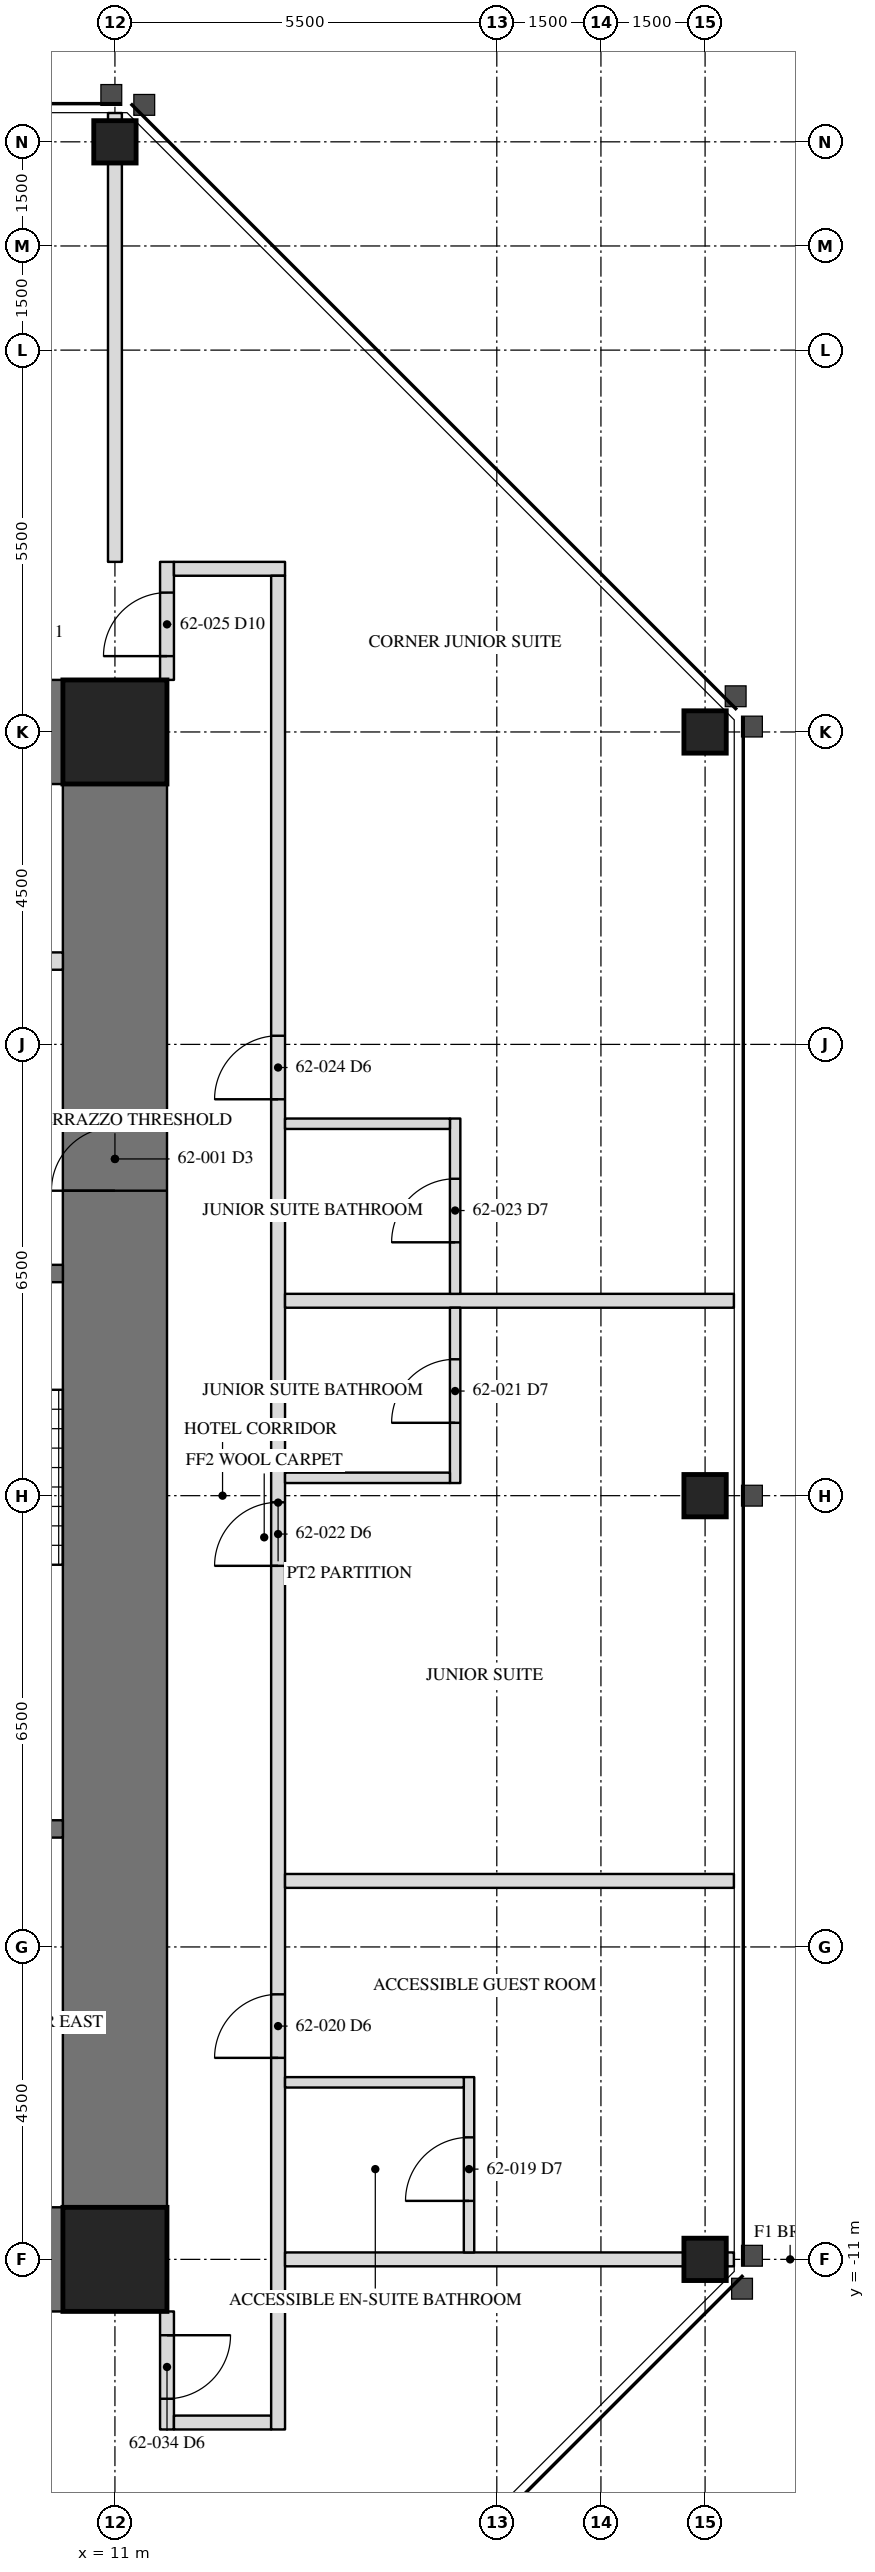
"""IFC4 building model, lengths in metres.
Left out: names, types, materials, properties, quantities, classifications, styles, units other than length and angle.
Written with IfcOpenShell. Run it as: python <this file> out.ifc"""

import sys

from ifc_helpers import new_model, si_unit, direction, frame, frame_2d, origin, origin_2d, place, context, subcontext, project, spatial, rectangle, hollow_rectangle, extrude, element, fill, save


model = new_model("IFC4")
c1 = context("Model", 3, precision=1e-05, world=origin(), true_north=direction((0.0, 1.0)))
c2 = subcontext(c1, "Body", "Model", "MODEL_VIEW")
j1 = project(units=[si_unit("LENGTHUNIT", "METRE"), si_unit("PLANEANGLEUNIT", "RADIAN")], contexts=[c1])
p1 = place(None, origin())
s1 = spatial("IfcSite", under=j1, at=p1, CompositionType="ELEMENT")
p2 = place(p1, origin())
s2 = spatial("IfcBuilding", under=s1, at=p2, CompositionType="ELEMENT")
p3 = place(p2, frame((0.0, 0.0, 253.7)))
s3 = spatial("IfcBuildingStorey", under=s2, at=p3, CompositionType="ELEMENT", Elevation=253.7)
for number, where, z_axis, x_axis in (
    (1, (19.5, -11.0, 0.0), (0.0, 0.0, 1.0), (0.0, 1.0, 0.0)),
    (2, (19.5, 0.0, 0.0), (0.0, 0.0, 1.0), (0.0, 1.0, 0.0)),
    (3, (19.5, 11.0, 0.0), (0.0, 0.0, 1.0), (0.0, 1.0, 0.0)),
    (4, (11.0, 19.5, 0.0), (0.0, 0.0, 1.0), (1.0, 0.0, 0.0)),
):
    element("IfcColumn", number, at=place(p3, frame(where, z_axis=z_axis, x_axis=x_axis)), inside=s3, PredefinedType="COLUMN", context=c2, shape_type="SweptSolid", body=[
        extrude(hollow_rectangle(XDim=0.61, YDim=0.61, WallThickness=0.051, at=origin_2d()), origin(), (0.0, 0.0, 1.0), 3.5),
    ])
p4 = place(p3, frame((11.0, -11.0, 0.0), z_axis=(0.0, 0.0, 1.0), x_axis=(0.0, 1.0, 0.0)))
e5 = element("IfcWall", 5, at=p4, inside=s3, PredefinedType="SHEAR", context=c2, shape_type="SweptSolid", body=[
    extrude(rectangle(XDim=22.0, YDim=1.5, at=frame_2d((11.0, 0.0))), origin(), (0.0, 0.0, 1.0), 3.5),
])
p5 = place(p4, frame((15.393, 0.0, 0.0)))
e6 = element("IfcOpeningElement", 6, at=p5, cuts=e5, PredefinedType="OPENING", context=c2, shape_type="SweptSolid", body=[
    extrude(rectangle(XDim=0.915, YDim=2.134, at=frame_2d((0.458, 1.067))), frame((0.0, 0.76, 0.0), z_axis=(0.0, -1.0, 0.0), x_axis=(1.0, 0.0, 0.0)), (0.0, 0.0, 1.0), 1.52),
])
for number, where, z_axis, x_axis in (
    (7, (11.0, 11.0, 0.0), (0.0, 0.0, 1.0), (-1.0, 0.0, 0.0)),
    (8, (6.5, -11.0, 0.0), (0.0, 0.0, 1.0), (1.0, 0.0, 0.0)),
):
    element("IfcWall", number, at=place(p3, frame(where, z_axis=z_axis, x_axis=x_axis)), inside=s3, PredefinedType="SHEAR", context=c2, shape_type="SweptSolid", body=[
        extrude(rectangle(XDim=4.5, YDim=1.5, at=frame_2d((2.25, 0.0))), origin(), (0.0, 0.0, 1.0), 3.5),
    ])
for number, where, z_axis, x_axis in (
    (9, (11.0, 11.0, 0.0), (0.0, 0.0, 1.0), (1.0, 0.0, 0.0)),
    (10, (11.0, -11.0, 0.0), (0.0, 0.0, 1.0), (1.0, 0.0, 0.0)),
):
    element("IfcColumn", number, at=place(p3, frame(where, z_axis=z_axis, x_axis=x_axis)), inside=s3, PredefinedType="COLUMN", context=c2, shape_type="SweptSolid", body=[
        extrude(hollow_rectangle(XDim=1.499, YDim=1.499, WallThickness=0.102, at=origin_2d()), origin(), (0.0, 0.0, 1.0), 3.5),
    ])
p6 = place(p3, frame((6.95, -4.8, 0.0), z_axis=(0.0, 0.0, 1.0), x_axis=(1.0, 0.0, 0.0)))
e11 = element("IfcWall", 11, at=p6, inside=s3, PredefinedType="SOLIDWALL", context=c2, shape_type="SweptSolid", body=[
    extrude(rectangle(XDim=3.3, YDim=0.25, at=frame_2d((1.65, 0.0))), origin(), (0.0, 0.0, 1.0), 3.31),
])
p7 = place(p3, frame((6.95, 3.2, 0.0), z_axis=(0.0, 0.0, 1.0), x_axis=(1.0, 0.0, 0.0)))
e12 = element("IfcWall", 12, at=p7, inside=s3, PredefinedType="SOLIDWALL", context=c2, shape_type="SweptSolid", body=[
    extrude(rectangle(XDim=3.3, YDim=0.25, at=frame_2d((1.65, 0.0))), origin(), (0.0, 0.0, 1.0), 3.31),
])
p8 = place(p7, frame((1.116, 0.0, 0.0)))
e13 = element("IfcOpeningElement", 13, at=p8, cuts=e12, PredefinedType="OPENING", context=c2, shape_type="SweptSolid", body=[
    extrude(rectangle(XDim=1.067, YDim=2.134, at=frame_2d((0.533, 1.067))), frame((0.0, 0.135, 0.0), z_axis=(0.0, -1.0, 0.0), x_axis=(1.0, 0.0, 0.0)), (0.0, 0.0, 1.0), 0.27),
])
p9 = place(p3, frame((6.95, 7.7, 0.0), z_axis=(0.0, 0.0, 1.0), x_axis=(1.0, 0.0, 0.0)))
e14 = element("IfcWall", 14, at=p9, inside=s3, PredefinedType="PARTITIONING", context=c2, shape_type="SweptSolid", body=[
    extrude(rectangle(XDim=3.3, YDim=0.25, at=frame_2d((1.65, 0.0))), origin(), (0.0, 0.0, 1.0), 3.31),
])
p10 = place(p9, frame((0.45, 0.0, 0.0)))
e15 = element("IfcOpeningElement", 15, at=p10, cuts=e14, PredefinedType="OPENING", context=c2, shape_type="SweptSolid", body=[
    extrude(rectangle(XDim=1.219, YDim=2.134, at=frame_2d((0.609, 1.067))), frame((0.0, 0.135, 0.0), z_axis=(0.0, -1.0, 0.0), x_axis=(1.0, 0.0, 0.0)), (0.0, 0.0, 1.0), 0.27),
])
p11 = place(p3, frame((11.75, 11.75, 0.0), z_axis=(0.0, 0.0, 1.0), x_axis=(0.0, 1.0, 0.0)))
e16 = element("IfcWall", 16, at=p11, inside=s3, PredefinedType="PARTITIONING", context=c2, shape_type="SweptSolid", body=[
    extrude(rectangle(XDim=1.7, YDim=0.2, at=frame_2d((0.85, 0.0))), origin(), (0.0, 0.0, 1.0), 3.31),
])
p12 = place(p11, frame((0.343, 0.0, 0.0)))
e17 = element("IfcOpeningElement", 17, at=p12, cuts=e16, PredefinedType="OPENING", context=c2, shape_type="SweptSolid", body=[
    extrude(rectangle(XDim=0.915, YDim=2.134, at=frame_2d((0.458, 1.067))), frame((0.0, 0.11, 0.0), z_axis=(0.0, -1.0, 0.0), x_axis=(1.0, 0.0, 0.0)), (0.0, 0.0, 1.0), 0.22),
])
p13 = place(p3, frame((13.45, 13.35, 0.0), z_axis=(0.0, 0.0, 1.0), x_axis=(-1.0, 0.0, 0.0)))
e18 = element("IfcWall", 18, at=p13, inside=s3, PredefinedType="PARTITIONING", context=c2, shape_type="SweptSolid", body=[
    extrude(rectangle(XDim=1.6, YDim=0.2, at=frame_2d((0.8, 0.0))), origin(), (0.0, 0.0, 1.0), 3.31),
])
p14 = place(p3, frame((11.75, -11.75, 0.0), z_axis=(0.0, 0.0, 1.0), x_axis=(0.0, -1.0, 0.0)))
e19 = element("IfcWall", 19, at=p14, inside=s3, PredefinedType="PARTITIONING", context=c2, shape_type="SweptSolid", body=[
    extrude(rectangle(XDim=1.7, YDim=0.2, at=frame_2d((0.85, 0.0))), origin(), (0.0, 0.0, 1.0), 3.31),
])
p15 = place(p14, frame((0.343, 0.0, 0.0)))
e20 = element("IfcOpeningElement", 20, at=p15, cuts=e19, PredefinedType="OPENING", context=c2, shape_type="SweptSolid", body=[
    extrude(rectangle(XDim=0.915, YDim=2.134, at=frame_2d((0.458, 1.067))), frame((0.0, 0.11, 0.0), z_axis=(0.0, -1.0, 0.0), x_axis=(1.0, 0.0, 0.0)), (0.0, 0.0, 1.0), 0.22),
])
p16 = place(p3, frame((11.85, -13.35, 0.0), z_axis=(0.0, 0.0, 1.0), x_axis=(1.0, 0.0, 0.0)))
e21 = element("IfcWall", 21, at=p16, inside=s3, PredefinedType="PARTITIONING", context=c2, shape_type="SweptSolid", body=[
    extrude(rectangle(XDim=1.4, YDim=0.2, at=frame_2d((0.7, 0.0))), origin(), (0.0, 0.0, 1.0), 3.31),
])
p17 = place(p3, frame((13.35, -13.45, 0.0), z_axis=(0.0, 0.0, 1.0), x_axis=(0.0, 1.0, 0.0)))
e22 = element("IfcWall", 22, at=p17, inside=s3, PredefinedType="PARTITIONING", context=c2, shape_type="SweptSolid", body=[
    extrude(rectangle(XDim=26.7, YDim=0.2, at=frame_2d((13.35, 0.0))), origin(), (0.0, 0.0, 1.0), 3.31),
])
p18 = place(p17, frame((5.353, 0.0, 0.0)))
e23 = element("IfcOpeningElement", 23, at=p18, cuts=e22, PredefinedType="OPENING", context=c2, shape_type="SweptSolid", body=[
    extrude(rectangle(XDim=0.915, YDim=2.134, at=frame_2d((0.458, 1.067))), frame((0.0, 0.11, 0.0), z_axis=(0.0, -1.0, 0.0), x_axis=(1.0, 0.0, 0.0)), (0.0, 0.0, 1.0), 0.22),
])
p19 = place(p17, frame((12.439, 0.0, 0.0)))
e24 = element("IfcOpeningElement", 24, at=p19, cuts=e22, PredefinedType="OPENING", context=c2, shape_type="SweptSolid", body=[
    extrude(rectangle(XDim=0.915, YDim=2.134, at=frame_2d((0.458, 1.067))), frame((0.0, 0.11, 0.0), z_axis=(0.0, -1.0, 0.0), x_axis=(1.0, 0.0, 0.0)), (0.0, 0.0, 1.0), 0.22),
])
p20 = place(p17, frame((19.159, 0.0, 0.0)))
e25 = element("IfcOpeningElement", 25, at=p20, cuts=e22, PredefinedType="OPENING", context=c2, shape_type="SweptSolid", body=[
    extrude(rectangle(XDim=0.915, YDim=2.134, at=frame_2d((0.458, 1.067))), frame((0.0, 0.11, 0.0), z_axis=(0.0, -1.0, 0.0), x_axis=(1.0, 0.0, 0.0)), (0.0, 0.0, 1.0), 0.22),
])
p21 = place(p3, frame((13.45, -11.0, 0.0), z_axis=(0.0, 0.0, 1.0), x_axis=(1.0, 0.0, 0.0)))
e26 = element("IfcWall", 26, at=p21, inside=s3, PredefinedType="PARTITIONING", context=c2, shape_type="SweptSolid", body=[
    extrude(rectangle(XDim=6.465, YDim=0.2, at=frame_2d((3.232, 0.0))), origin(), (0.0, 0.0, 1.0), 2.383),
])
for number, where, z_axis, x_axis in (
    (27, (13.45, -5.549, 0.0), (0.0, 0.0, 1.0), (1.0, 0.0, 0.0)),
    (28, (13.45, 2.807, 0.0), (0.0, 0.0, 1.0), (1.0, 0.0, 0.0)),
):
    element("IfcWall", number, at=place(p3, frame(where, z_axis=z_axis, x_axis=x_axis)), inside=s3, PredefinedType="PARTITIONING", context=c2, shape_type="SweptSolid", body=[
        extrude(rectangle(XDim=6.465, YDim=0.2, at=frame_2d((3.232, 0.0))), origin(), (0.0, 0.0, 1.0), 3.31),
    ])
p22 = place(p3, frame((16.1, -10.9, 0.0), z_axis=(0.0, 0.0, 1.0), x_axis=(0.0, 1.0, 0.0)))
e29 = element("IfcWall", 29, at=p22, inside=s3, PredefinedType="PARTITIONING", context=c2, shape_type="SweptSolid", body=[
    extrude(rectangle(XDim=2.525, YDim=0.15, at=frame_2d((1.262, 0.0))), origin(), (0.0, 0.0, 1.0), 3.31),
])
p23 = place(p22, frame((0.742, 0.0, 0.0)))
e30 = element("IfcOpeningElement", 30, at=p23, cuts=e29, PredefinedType="OPENING", context=c2, shape_type="SweptSolid", body=[
    extrude(rectangle(XDim=0.915, YDim=2.032, at=frame_2d((0.458, 1.016))), frame((0.0, 0.085, 0.0), z_axis=(0.0, -1.0, 0.0), x_axis=(1.0, 0.0, 0.0)), (0.0, 0.0, 1.0), 0.17),
])
p24 = place(p3, frame((13.45, -8.45, 0.0), z_axis=(0.0, 0.0, 1.0), x_axis=(1.0, 0.0, 0.0)))
e31 = element("IfcWall", 31, at=p24, inside=s3, PredefinedType="PARTITIONING", context=c2, shape_type="SweptSolid", body=[
    extrude(rectangle(XDim=2.575, YDim=0.15, at=frame_2d((1.288, 0.0))), origin(), (0.0, 0.0, 1.0), 3.31),
])
p25 = place(p3, frame((15.9, 0.182, 0.0), z_axis=(0.0, 0.0, 1.0), x_axis=(0.0, 1.0, 0.0)))
e32 = element("IfcWall", 32, at=p25, inside=s3, PredefinedType="PARTITIONING", context=c2, shape_type="SweptSolid", body=[
    extrude(rectangle(XDim=2.525, YDim=0.15, at=frame_2d((1.263, 0.0))), origin(), (0.0, 0.0, 1.0), 3.31),
])
p26 = place(p25, frame((0.867, 0.0, 0.0)))
e33 = element("IfcOpeningElement", 33, at=p26, cuts=e32, PredefinedType="OPENING", context=c2, shape_type="SweptSolid", body=[
    extrude(rectangle(XDim=0.915, YDim=2.032, at=frame_2d((0.458, 1.016))), frame((0.0, 0.085, 0.0), z_axis=(0.0, -1.0, 0.0), x_axis=(1.0, 0.0, 0.0)), (0.0, 0.0, 1.0), 0.17),
])
p27 = place(p3, frame((13.45, 0.257, 0.0), z_axis=(0.0, 0.0, 1.0), x_axis=(1.0, 0.0, 0.0)))
e34 = element("IfcWall", 34, at=p27, inside=s3, PredefinedType="PARTITIONING", context=c2, shape_type="SweptSolid", body=[
    extrude(rectangle(XDim=2.375, YDim=0.15, at=frame_2d((1.188, 0.0))), origin(), (0.0, 0.0, 1.0), 3.31),
])
p28 = place(p3, frame((15.9, 2.907, 0.0), z_axis=(0.0, 0.0, 1.0), x_axis=(0.0, 1.0, 0.0)))
e35 = element("IfcWall", 35, at=p28, inside=s3, PredefinedType="PARTITIONING", context=c2, shape_type="SweptSolid", body=[
    extrude(rectangle(XDim=2.525, YDim=0.15, at=frame_2d((1.262, 0.0))), origin(), (0.0, 0.0, 1.0), 3.31),
])
p29 = place(p28, frame((0.742, 0.0, 0.0)))
e36 = element("IfcOpeningElement", 36, at=p29, cuts=e35, PredefinedType="OPENING", context=c2, shape_type="SweptSolid", body=[
    extrude(rectangle(XDim=0.915, YDim=2.032, at=frame_2d((0.458, 1.016))), frame((0.0, 0.085, 0.0), z_axis=(0.0, -1.0, 0.0), x_axis=(1.0, 0.0, 0.0)), (0.0, 0.0, 1.0), 0.17),
])
p30 = place(p3, frame((13.45, 5.357, 0.0), z_axis=(0.0, 0.0, 1.0), x_axis=(1.0, 0.0, 0.0)))
e37 = element("IfcWall", 37, at=p30, inside=s3, PredefinedType="PARTITIONING", context=c2, shape_type="SweptSolid", body=[
    extrude(rectangle(XDim=2.375, YDim=0.15, at=frame_2d((1.188, 0.0))), origin(), (0.0, 0.0, 1.0), 3.31),
])
p31 = place(p3, frame((11.0, 13.45, 0.0), z_axis=(0.0, 0.0, 1.0), x_axis=(0.0, 1.0, 0.0)))
e38 = element("IfcWall", 38, at=p31, inside=s3, PredefinedType="PARTITIONING", context=c2, shape_type="SweptSolid", body=[
    extrude(rectangle(XDim=6.465, YDim=0.2, at=frame_2d((3.232, 0.0))), origin(), (0.0, 0.0, 1.0), 2.383),
])
p32 = place(p5, origin())
e39 = element("IfcDoor", 39, at=p32, inside=s3, OperationType="SINGLE_SWING_RIGHT", PredefinedType="DOOR", context=c2, shape_type="SweptSolid", body=[
    extrude(rectangle(XDim=0.915, YDim=2.134, at=frame_2d((0.458, 1.067))), frame((0.0, -0.675, 0.0), z_axis=(0.0, -1.0, 0.0), x_axis=(1.0, 0.0, 0.0)), (0.0, 0.0, 1.0), 0.05),
])
fill(e6, e39)
p33 = place(p23, origin())
e40 = element("IfcDoor", 40, at=p33, inside=s3, OperationType="SINGLE_SWING_LEFT", PredefinedType="DOOR", context=c2, shape_type="SweptSolid", body=[
    extrude(rectangle(XDim=0.915, YDim=2.032, at=frame_2d((0.458, 1.016))), frame((0.0, 0.025, 0.0), z_axis=(0.0, -1.0, 0.0), x_axis=(1.0, 0.0, 0.0)), (0.0, 0.0, 1.0), 0.05),
])
fill(e30, e40)
p34 = place(p18, origin())
e41 = element("IfcDoor", 41, at=p34, inside=s3, OperationType="SINGLE_SWING_LEFT", PredefinedType="DOOR", context=c2, shape_type="SweptSolid", body=[
    extrude(rectangle(XDim=0.915, YDim=2.134, at=frame_2d((0.458, 1.067))), frame((0.0, 0.025, 0.0), z_axis=(0.0, -1.0, 0.0), x_axis=(1.0, 0.0, 0.0)), (0.0, 0.0, 1.0), 0.05),
])
fill(e23, e41)
p35 = place(p26, origin())
e42 = element("IfcDoor", 42, at=p35, inside=s3, OperationType="SINGLE_SWING_LEFT", PredefinedType="DOOR", context=c2, shape_type="SweptSolid", body=[
    extrude(rectangle(XDim=0.915, YDim=2.032, at=frame_2d((0.458, 1.016))), frame((0.0, 0.025, 0.0), z_axis=(0.0, -1.0, 0.0), x_axis=(1.0, 0.0, 0.0)), (0.0, 0.0, 1.0), 0.05),
])
fill(e33, e42)
p36 = place(p19, origin())
e43 = element("IfcDoor", 43, at=p36, inside=s3, OperationType="SINGLE_SWING_LEFT", PredefinedType="DOOR", context=c2, shape_type="SweptSolid", body=[
    extrude(rectangle(XDim=0.915, YDim=2.134, at=frame_2d((0.458, 1.067))), frame((0.0, 0.025, 0.0), z_axis=(0.0, -1.0, 0.0), x_axis=(1.0, 0.0, 0.0)), (0.0, 0.0, 1.0), 0.05),
])
fill(e24, e43)
p37 = place(p29, origin())
e44 = element("IfcDoor", 44, at=p37, inside=s3, OperationType="SINGLE_SWING_LEFT", PredefinedType="DOOR", context=c2, shape_type="SweptSolid", body=[
    extrude(rectangle(XDim=0.915, YDim=2.032, at=frame_2d((0.458, 1.016))), frame((0.0, 0.025, 0.0), z_axis=(0.0, -1.0, 0.0), x_axis=(1.0, 0.0, 0.0)), (0.0, 0.0, 1.0), 0.05),
])
fill(e36, e44)
p38 = place(p20, origin())
e45 = element("IfcDoor", 45, at=p38, inside=s3, OperationType="SINGLE_SWING_LEFT", PredefinedType="DOOR", context=c2, shape_type="SweptSolid", body=[
    extrude(rectangle(XDim=0.915, YDim=2.134, at=frame_2d((0.458, 1.067))), frame((0.0, 0.025, 0.0), z_axis=(0.0, -1.0, 0.0), x_axis=(1.0, 0.0, 0.0)), (0.0, 0.0, 1.0), 0.05),
])
fill(e25, e45)
p39 = place(p12, origin())
e46 = element("IfcDoor", 46, at=p39, inside=s3, OperationType="SINGLE_SWING_LEFT", PredefinedType="DOOR", context=c2, shape_type="SweptSolid", body=[
    extrude(rectangle(XDim=0.915, YDim=2.134, at=frame_2d((0.458, 1.067))), frame((0.0, 0.025, 0.0), z_axis=(0.0, -1.0, 0.0), x_axis=(1.0, 0.0, 0.0)), (0.0, 0.0, 1.0), 0.05),
])
fill(e17, e46)
p40 = place(p15, origin())
e47 = element("IfcDoor", 47, at=p40, inside=s3, OperationType="SINGLE_SWING_LEFT", PredefinedType="DOOR", context=c2, shape_type="SweptSolid", body=[
    extrude(rectangle(XDim=0.915, YDim=2.134, at=frame_2d((0.458, 1.067))), frame((0.0, 0.025, 0.0), z_axis=(0.0, -1.0, 0.0), x_axis=(1.0, 0.0, 0.0)), (0.0, 0.0, 1.0), 0.05),
])
fill(e20, e47)
save(model, sys.argv[1])
